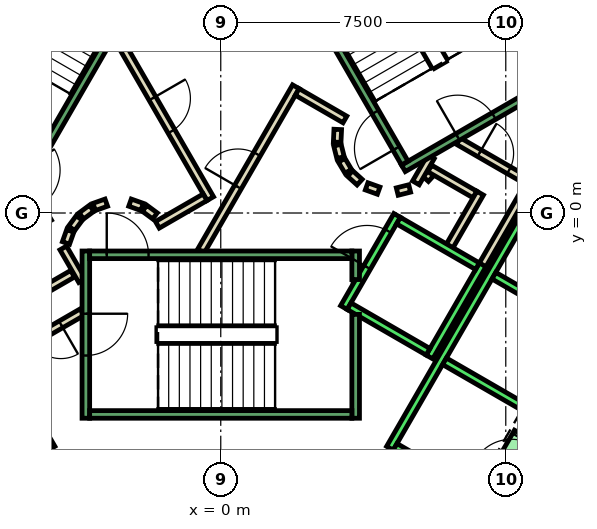
"""IFC4 building model, lengths in metres.
Left out: names, types, materials, properties, quantities, classifications, styles, units other than length and angle.
Written with IfcOpenShell. Run it as: python <this file> out.ifc"""

import sys

from ifc_helpers import new_model, si_unit, direction, frame, frame_2d, origin, place, context, subcontext, project, spatial, polyline, rectangle, outline, extrude, element, fill, save


model = new_model("IFC4")
c1 = context("Model", 3, precision=1e-05, world=origin(), true_north=direction((0.0, 1.0)))
c2 = subcontext(c1, "Body", "Model", "MODEL_VIEW")
j1 = project(units=[si_unit("LENGTHUNIT", "METRE"), si_unit("PLANEANGLEUNIT", "RADIAN")], contexts=[c1])
p1 = place(None, origin())
s1 = spatial("IfcSite", under=j1, at=p1, CompositionType="ELEMENT")
p2 = place(p1, origin())
s2 = spatial("IfcBuilding", under=s1, at=p2, CompositionType="ELEMENT")
p3 = place(p2, frame((0.0, 0.0, 155.0)))
s3 = spatial("IfcBuildingStorey", under=s2, at=p3, CompositionType="ELEMENT", Elevation=155.0)
p4 = place(p3, frame((0.0, 0.0, 3.6)))
e1 = element("IfcWall", 1, at=p4, inside=s3, PredefinedType="SHEAR", context=c2, shape_type="SweptSolid", body=[
    extrude(outline(polyline([(8.767, -6.314), (8.075, -5.914), (7.424, -7.04), (8.117, -7.44), (8.767, -6.314)])), origin(), (0.0, 0.0, 1.0), 0.2),
])
p5 = place(p3, frame((5.39, 0.898, 0.0), z_axis=(0.0, 0.0, 1.0), x_axis=(0.673828488714, 0.738887791073, 0.0)))
e2 = element("IfcWall", 2, at=p5, inside=s3, PredefinedType="PARTITIONING", context=c2, shape_type="SweptSolid", body=[
    extrude(rectangle(XDim=0.263, YDim=0.2, at=frame_2d((0.131, 0.0))), origin(), (0.0, 0.0, 1.0), 3.8),
])
p6 = place(p3, frame((5.499, 1.172, 0.0), z_axis=(0.0, 0.0, 1.0), x_axis=(0.866333505267, -0.499465972466, 0.0)))
e3 = element("IfcWall", 3, at=p6, inside=s3, PredefinedType="PARTITIONING", context=c2, shape_type="SweptSolid", body=[
    extrude(rectangle(XDim=1.374, YDim=0.2, at=frame_2d((0.687, 0.0))), origin(), (0.0, 0.0, 1.0), 3.8),
])
p7 = place(p3, frame((6.826, 0.522, 0.0), z_axis=(0.0, 0.0, 1.0), x_axis=(-0.500016722714, -0.866015748706, 0.0)))
e4 = element("IfcWall", 4, at=p7, inside=s3, PredefinedType="PARTITIONING", context=c2, shape_type="SweptSolid", body=[
    extrude(rectangle(XDim=1.7, YDim=0.2, at=frame_2d((0.85, 0.0))), origin(), (0.0, 0.0, 1.0), 3.8),
])
p8 = place(p3, frame((6.25, 1.894, 0.0), z_axis=(0.0, 0.0, 1.0), x_axis=(0.866043184279, -0.499969202016, 0.0)))
e5 = element("IfcWall", 5, at=p8, inside=s3, PredefinedType="PARTITIONING", context=c2, shape_type="SweptSolid", body=[
    extrude(rectangle(XDim=2.084, YDim=0.2, at=frame_2d((1.042, 0.0))), origin(), (0.0, 0.0, 1.0), 3.8),
])
p9 = place(p8, frame((0.642, 0.0, 0.0)))
e6 = element("IfcOpeningElement", 6, at=p9, cuts=e5, PredefinedType="OPENING", context=c2, shape_type="SweptSolid", body=[
    extrude(rectangle(XDim=0.9, YDim=2.1, at=frame_2d((0.45, 1.05))), frame((0.0, 0.11, 0.0), z_axis=(0.0, -1.0, 0.0), x_axis=(1.0, 0.0, 0.0)), (0.0, 0.0, 1.0), 0.22),
])
p10 = place(p3, frame((8.192, 0.888, 0.0), z_axis=(0.0, 0.0, 1.0), x_axis=(-0.499940625693, -0.866059680843, 0.0)))
e7 = element("IfcWall", 7, at=p10, inside=s3, PredefinedType="PARTITIONING", context=c2, shape_type="SweptSolid", body=[
    extrude(rectangle(XDim=2.68, YDim=0.2, at=frame_2d((1.34, 0.0))), origin(), (0.0, 0.0, 1.0), 3.8),
])
p11 = place(p3, frame((5.135, 0.793, 0.0), z_axis=(0.0, 0.0, 1.0), x_axis=(0.499526442893, 0.866298639529, 0.0)))
e8 = element("IfcWall", 8, at=p11, inside=s3, PredefinedType="PARTITIONING", context=c2, shape_type="SweptSolid", body=[
    extrude(rectangle(XDim=0.791, YDim=0.2, at=frame_2d((0.396, 0.0))), origin(), (0.0, 0.0, 1.0), 3.8),
])
p12 = place(p3, frame((-3.9, -1.599, 0.0), z_axis=(0.0, 0.0, 1.0), x_axis=(-0.865969445389, -0.500096910261, 0.0)))
e9 = element("IfcWall", 9, at=p12, inside=s3, PredefinedType="PARTITIONING", context=c2, shape_type="SweptSolid", body=[
    extrude(rectangle(XDim=1.373, YDim=0.2, at=frame_2d((0.687, 0.0))), origin(), (0.0, 0.0, 1.0), 3.8),
])
p13 = place(p3, frame((-3.65, -2.61, 0.0), z_axis=(0.0, 0.0, 1.0), x_axis=(-0.866072462134, -0.499918483688, 0.0)))
e10 = element("IfcWall", 10, at=p13, inside=s3, PredefinedType="PARTITIONING", context=c2, shape_type="SweptSolid", body=[
    extrude(rectangle(XDim=2.084, YDim=0.2, at=frame_2d((1.042, 0.0))), origin(), (0.0, 0.0, 1.0), 3.8),
])
p14 = place(p13, frame((0.642, 0.0, 0.0)))
e11 = element("IfcOpeningElement", 11, at=p14, cuts=e10, PredefinedType="OPENING", context=c2, shape_type="SweptSolid", body=[
    extrude(rectangle(XDim=0.9, YDim=2.1, at=frame_2d((0.45, 1.05))), frame((0.0, 0.11, 0.0), z_axis=(0.0, -1.0, 0.0), x_axis=(1.0, 0.0, 0.0)), (0.0, 0.0, 1.0), 0.22),
])
p15 = place(p3, frame((-4.145, -0.92, 0.0), z_axis=(0.0, 0.0, 1.0), x_axis=(0.499743786207, -0.866173278362, 0.0)))
e12 = element("IfcWall", 12, at=p15, inside=s3, PredefinedType="PARTITIONING", context=c2, shape_type="SweptSolid", body=[
    extrude(rectangle(XDim=0.991, YDim=0.2, at=frame_2d((0.495, 0.0))), origin(), (0.0, 0.0, 1.0), 3.8),
])
p16 = place(p3, frame((-0.52, -1.0, 0.0), z_axis=(0.0, 0.0, 1.0), x_axis=(0.50011622646, 0.865958290007, 0.0)))
e13 = element("IfcWall", 13, at=p16, inside=s3, PredefinedType="PARTITIONING", context=c2, shape_type="SweptSolid", body=[
    extrude(rectangle(XDim=4.991, YDim=0.2, at=frame_2d((2.496, 0.0))), origin(), (0.0, 0.0, 1.0), 3.8),
])
p17 = place(p16, frame((1.945, 0.0, 0.0)))
e14 = element("IfcOpeningElement", 14, at=p17, cuts=e13, PredefinedType="OPENING", context=c2, shape_type="SweptSolid", body=[
    extrude(rectangle(XDim=1.0, YDim=2.1, at=frame_2d((0.5, 1.05))), frame((0.0, 0.11, 0.0), z_axis=(0.0, -1.0, 0.0), x_axis=(1.0, 0.0, 0.0)), (0.0, 0.0, 1.0), 0.22),
])
p18 = place(p3, frame((2.012, 3.186, 0.0), z_axis=(0.0, 0.0, 1.0), x_axis=(0.865891012941, -0.500232699559, 0.0)))
e15 = element("IfcWall", 15, at=p18, inside=s3, PredefinedType="PARTITIONING", context=c2, shape_type="SweptSolid", body=[
    extrude(rectangle(XDim=1.449, YDim=0.2, at=frame_2d((0.725, 0.0))), origin(), (0.0, 0.0, 1.0), 3.8),
])
p19 = place(p3, frame((3.079, 2.199, 0.0), z_axis=(0.0, 0.0, 1.0), x_axis=(-0.047771483479, -0.998858290933, 0.0)))
e16 = element("IfcWall", 16, at=p19, inside=s3, PredefinedType="PARTITIONING", context=c2, shape_type="SweptSolid", body=[
    extrude(rectangle(XDim=0.337, YDim=0.2, at=frame_2d((0.169, 0.0))), origin(), (0.0, 0.0, 1.0), 3.8),
])
p20 = place(p3, frame((3.07, 1.786, 0.0), z_axis=(0.0, 0.0, 1.0), x_axis=(0.242705583207, -0.970099994784, 0.0)))
e17 = element("IfcWall", 17, at=p20, inside=s3, PredefinedType="PARTITIONING", context=c2, shape_type="SweptSolid", body=[
    extrude(rectangle(XDim=0.338, YDim=0.2, at=frame_2d((0.169, 0.0))), origin(), (0.0, 0.0, 1.0), 3.8),
])
for number, where, z_axis, x_axis in (
    (18, (3.182, 1.388, 0.0), (0.0, 0.0, 1.0), (0.512, -0.859, 0.0)),
    (19, (3.404, 1.039, 0.0), (0.0, 0.0, 1.0), (0.74, -0.672, 0.0)),
):
    element("IfcWall", number, at=place(p3, frame(where, z_axis=z_axis, x_axis=x_axis)), inside=s3, PredefinedType="PARTITIONING", context=c2, shape_type="SweptSolid", body=[
        extrude(rectangle(XDim=0.338, YDim=0.2, at=frame_2d((0.169, 0.0))), origin(), (0.0, 0.0, 1.0), 3.8),
    ])
p21 = place(p3, frame((3.838, 0.702, 0.0), z_axis=(0.0, 0.0, 1.0), x_axis=(0.941035081519, -0.338308993895, 0.0)))
e20 = element("IfcWall", 20, at=p21, inside=s3, PredefinedType="PARTITIONING", context=c2, shape_type="SweptSolid", body=[
    extrude(rectangle(XDim=0.337, YDim=0.2, at=frame_2d((0.168, 0.0))), origin(), (0.0, 0.0, 1.0), 3.8),
])
p22 = place(p3, frame((4.644, 0.564, 0.0), z_axis=(0.0, 0.0, 1.0), x_axis=(0.969929076366, 0.243387729394, 0.0)))
e21 = element("IfcWall", 21, at=p22, inside=s3, PredefinedType="PARTITIONING", context=c2, shape_type="SweptSolid", body=[
    extrude(rectangle(XDim=0.337, YDim=0.2, at=frame_2d((0.168, 0.0))), origin(), (0.0, 0.0, 1.0), 3.8),
])
p23 = place(p3, frame((-2.771, 4.7, 0.0), z_axis=(0.0, 0.0, 1.0), x_axis=(0.499969479948, -0.866043023828, 0.0)))
e22 = element("IfcWall", 22, at=p23, inside=s3, PredefinedType="PARTITIONING", context=c2, shape_type="SweptSolid", body=[
    extrude(rectangle(XDim=4.99, YDim=0.2, at=frame_2d((2.495, 0.0))), origin(), (0.0, 0.0, 1.0), 3.8),
])
p24 = place(p23, frame((1.945, 0.0, 0.0)))
e23 = element("IfcOpeningElement", 23, at=p24, cuts=e22, PredefinedType="OPENING", context=c2, shape_type="SweptSolid", body=[
    extrude(rectangle(XDim=1.0, YDim=2.1, at=frame_2d((0.5, 1.05))), frame((0.0, 0.11, 0.0), z_axis=(0.0, -1.0, 0.0), x_axis=(1.0, 0.0, 0.0)), (0.0, 0.0, 1.0), 0.22),
])
p25 = place(p3, frame((-0.412, 0.414, 0.0), z_axis=(0.0, 0.0, 1.0), x_axis=(-0.866017369001, -0.500013916395, 0.0)))
e24 = element("IfcWall", 24, at=p25, inside=s3, PredefinedType="PARTITIONING", context=c2, shape_type="SweptSolid", body=[
    extrude(rectangle(XDim=1.45, YDim=0.2, at=frame_2d((0.725, 0.0))), origin(), (0.0, 0.0, 1.0), 3.8),
])
p26 = place(p3, frame((-1.731, -0.077, 0.0), z_axis=(0.0, 0.0, 1.0), x_axis=(-0.804311165252, 0.594208338422, 0.0)))
e25 = element("IfcWall", 25, at=p26, inside=s3, PredefinedType="PARTITIONING", context=c2, shape_type="SweptSolid", body=[
    extrude(rectangle(XDim=0.338, YDim=0.2, at=frame_2d((0.169, 0.0))), origin(), (0.0, 0.0, 1.0), 3.8),
])
p27 = place(p3, frame((-2.07, 0.16, 0.0), z_axis=(0.0, 0.0, 1.0), x_axis=(-0.942199461132, 0.335052496547, 0.0)))
e26 = element("IfcWall", 26, at=p27, inside=s3, PredefinedType="PARTITIONING", context=c2, shape_type="SweptSolid", body=[
    extrude(rectangle(XDim=0.337, YDim=0.2, at=frame_2d((0.169, 0.0))), origin(), (0.0, 0.0, 1.0), 3.8),
])
p28 = place(p3, frame((-3.012, 0.273, 0.0), z_axis=(0.0, 0.0, 1.0), x_axis=(-0.942280615813, -0.334824194261, 0.0)))
e27 = element("IfcWall", 27, at=p28, inside=s3, PredefinedType="PARTITIONING", context=c2, shape_type="SweptSolid", body=[
    extrude(rectangle(XDim=0.338, YDim=0.2, at=frame_2d((0.169, 0.0))), origin(), (0.0, 0.0, 1.0), 3.8),
])
p29 = place(p3, frame((-3.397, 0.124, 0.0), z_axis=(0.0, 0.0, 1.0), x_axis=(-0.804311165252, -0.594208338422, 0.0)))
e28 = element("IfcWall", 28, at=p29, inside=s3, PredefinedType="PARTITIONING", context=c2, shape_type="SweptSolid", body=[
    extrude(rectangle(XDim=0.338, YDim=0.2, at=frame_2d((0.169, 0.0))), origin(), (0.0, 0.0, 1.0), 3.8),
])
p30 = place(p3, frame((-3.723, -0.131, 0.0), z_axis=(0.0, 0.0, 1.0), x_axis=(-0.594675113454, -0.803966112121, 0.0)))
e29 = element("IfcWall", 29, at=p30, inside=s3, PredefinedType="PARTITIONING", context=c2, shape_type="SweptSolid", body=[
    extrude(rectangle(XDim=0.338, YDim=0.2, at=frame_2d((0.169, 0.0))), origin(), (0.0, 0.0, 1.0), 3.8),
])
p31 = place(p3, frame((-3.96, -0.47, 0.0), z_axis=(0.0, 0.0, 1.0), x_axis=(-0.334824194261, -0.942280615813, 0.0)))
e30 = element("IfcWall", 30, at=p31, inside=s3, PredefinedType="PARTITIONING", context=c2, shape_type="SweptSolid", body=[
    extrude(rectangle(XDim=0.338, YDim=0.2, at=frame_2d((0.169, 0.0))), origin(), (0.0, 0.0, 1.0), 3.8),
])
p32 = place(p3, frame((-9.751, 2.99, 0.0), z_axis=(0.0, 0.0, 1.0), x_axis=(0.50000090737, -0.866024879913, 0.0)))
e31 = element("IfcWall", 31, at=p32, inside=s3, PredefinedType="STANDARD", context=c2, shape_type="SweptSolid", body=[
    extrude(rectangle(XDim=10.6, YDim=0.2, at=frame_2d((5.3, 0.0))), origin(), (0.0, 0.0, 1.0), 3.8),
])
p33 = place(p3, frame((3.24, -2.488, 0.0), z_axis=(0.0, 0.0, 1.0), x_axis=(0.49994636267, 0.866056369097, 0.0)))
e32 = element("IfcWall", 32, at=p33, inside=s3, PredefinedType="STANDARD", context=c2, shape_type="SweptSolid", body=[
    extrude(rectangle(XDim=2.8, YDim=0.2, at=frame_2d((1.4, 0.0))), origin(), (0.0, 0.0, 1.0), 3.8),
])
p34 = place(p33, frame((1.225, 0.0, 0.0)))
e33 = element("IfcOpeningElement", 33, at=p34, cuts=e32, PredefinedType="OPENING", context=c2, shape_type="SweptSolid", body=[
    extrude(rectangle(XDim=1.1, YDim=2.1, at=frame_2d((0.55, 1.05))), frame((0.0, 0.11, 0.0), z_axis=(0.0, -1.0, 0.0), x_axis=(1.0, 0.0, 0.0)), (0.0, 0.0, 1.0), 0.22),
])
p35 = place(p3, frame((5.492, -3.788, 0.0), z_axis=(0.0, 0.0, 1.0), x_axis=(0.500011755427, 0.866018616679, 0.0)))
e34 = element("IfcWall", 34, at=p35, inside=s3, PredefinedType="STANDARD", context=c2, shape_type="SweptSolid", body=[
    extrude(rectangle(XDim=2.8, YDim=0.2, at=frame_2d((1.4, 0.0))), origin(), (0.0, 0.0, 1.0), 3.8),
])
p36 = place(p3, frame((3.377, -2.452, 0.0), z_axis=(0.0, 0.0, 1.0), x_axis=(0.865955154139, -0.50012165622, 0.0)))
e35 = element("IfcWall", 35, at=p36, inside=s3, PredefinedType="STANDARD", context=c2, shape_type="SweptSolid", body=[
    extrude(rectangle(XDim=2.4, YDim=0.2, at=frame_2d((1.2, 0.0))), origin(), (0.0, 0.0, 1.0), 3.8),
])
p37 = place(p3, frame((4.677, -0.2, 0.0), z_axis=(0.0, 0.0, 1.0), x_axis=(0.865973769406, -0.500089422704, 0.0)))
e36 = element("IfcWall", 36, at=p37, inside=s3, PredefinedType="STANDARD", context=c2, shape_type="SweptSolid", body=[
    extrude(rectangle(XDim=2.399, YDim=0.2, at=frame_2d((1.2, 0.0))), origin(), (0.0, 0.0, 1.0), 3.8),
])
p38 = place(p3, frame((4.451, -6.19, 0.0), z_axis=(0.0, 0.0, 1.0), x_axis=(0.50000090737, 0.866024879913, 0.0)))
e37 = element("IfcWall", 37, at=p38, inside=s3, PredefinedType="STANDARD", context=c2, shape_type="SweptSolid", body=[
    extrude(rectangle(XDim=10.6, YDim=0.2, at=frame_2d((5.3, 0.0))), origin(), (0.0, 0.0, 1.0), 3.8),
])
for number, where, z_axis, x_axis in (
    (38, (4.588, -6.153, 0.0), (0.0, 0.0, 1.0), (0.866, -0.5, 0.0)),
    (39, (5.888, -3.902, 0.0), (0.0, 0.0, 1.0), (0.866, -0.5, 0.0)),
    (40, (7.188, -1.65, 0.0), (0.0, 0.0, 1.0), (0.866, -0.5, 0.0)),
):
    element("IfcWall", number, at=place(p3, frame(where, z_axis=z_axis, x_axis=x_axis)), inside=s3, PredefinedType="STANDARD", context=c2, shape_type="SweptSolid", body=[
        extrude(rectangle(XDim=2.5, YDim=0.2, at=frame_2d((1.25, 0.0))), origin(), (0.0, 0.0, 1.0), 3.8),
    ])
p39 = place(p3, frame((7.598, -7.14, 0.0), z_axis=(0.0, 0.0, 1.0), x_axis=(0.500362116554, 0.865816234728, 0.0)))
e41 = element("IfcWall", 41, at=p39, inside=s3, PredefinedType="STANDARD", context=c2, shape_type="SweptSolid", body=[
    extrude(rectangle(XDim=1.299, YDim=1.2, at=frame_2d((0.65, 0.0))), origin(), (0.0, 0.0, 1.0), 2.4),
])
p40 = place(p39, frame((0.1, 0.0, 0.0)))
e42 = element("IfcOpeningElement", 42, at=p40, cuts=e41, PredefinedType="OPENING", context=c2, shape_type="SweptSolid", body=[
    extrude(rectangle(XDim=1.1, YDim=2.3, at=frame_2d((0.55, 1.15))), frame((0.0, 0.61, 0.0), z_axis=(0.0, -1.0, 0.0), x_axis=(1.0, 0.0, 0.0)), (0.0, 0.0, 1.0), 1.22),
])
p41 = place(p3, frame((-3.55, -1.0, 0.0), z_axis=(0.0, 0.0, 1.0), x_axis=(0.0, -1.0, 0.0)))
e43 = element("IfcWall", 43, at=p41, inside=s3, PredefinedType="STANDARD", context=c2, shape_type="SweptSolid", body=[
    extrude(rectangle(XDim=4.4, YDim=0.2, at=frame_2d((2.2, 0.0))), origin(), (0.0, 0.0, 1.0), 3.8),
])
p42 = place(p41, frame((1.65, 0.0, 0.0)))
e44 = element("IfcOpeningElement", 44, at=p42, cuts=e43, PredefinedType="OPENING", context=c2, shape_type="SweptSolid", body=[
    extrude(rectangle(XDim=1.1, YDim=2.2, at=frame_2d((0.55, 1.1))), frame((0.0, 0.11, 0.0), z_axis=(0.0, -1.0, 0.0), x_axis=(1.0, 0.0, 0.0)), (0.0, 0.0, 1.0), 0.22),
])
p43 = place(p3, frame((3.55, -2.667, 0.0), z_axis=(0.0, 0.0, 1.0), x_axis=(0.0, -1.0, 0.0)))
e45 = element("IfcWall", 45, at=p43, inside=s3, PredefinedType="STANDARD", context=c2, shape_type="SweptSolid", body=[
    extrude(rectangle(XDim=2.733, YDim=0.2, at=frame_2d((1.366, 0.0))), origin(), (0.0, 0.0, 1.0), 3.8),
])
p44 = place(p3, frame((3.55, -1.0, 0.0), z_axis=(0.0, 0.0, 1.0), x_axis=(0.0, -1.0, 0.0)))
e46 = element("IfcWall", 46, at=p44, inside=s3, PredefinedType="STANDARD", context=c2, shape_type="SweptSolid", body=[
    extrude(rectangle(XDim=0.751, YDim=0.2, at=frame_2d((0.375, 0.0))), origin(), (0.0, 0.0, 1.0), 3.8),
])
p45 = place(p3, frame((-3.45, -1.1, 0.0), z_axis=(0.0, 0.0, 1.0), x_axis=(1.0, 0.0, 0.0)))
e47 = element("IfcWall", 47, at=p45, inside=s3, PredefinedType="STANDARD", context=c2, shape_type="SweptSolid", body=[
    extrude(rectangle(XDim=6.9, YDim=0.2, at=frame_2d((3.45, 0.0))), origin(), (0.0, 0.0, 1.0), 3.8),
])
p46 = place(p45, frame((0.45, 0.0, 0.0)))
e48 = element("IfcOpeningElement", 48, at=p46, cuts=e47, PredefinedType="OPENING", context=c2, shape_type="SweptSolid", body=[
    extrude(rectangle(XDim=1.1, YDim=2.2, at=frame_2d((0.55, 1.1))), frame((0.0, 0.11, 0.0), z_axis=(0.0, -1.0, 0.0), x_axis=(1.0, 0.0, 0.0)), (0.0, 0.0, 1.0), 0.22),
])
p47 = place(p3, frame((-3.45, -5.3, 0.0), z_axis=(0.0, 0.0, 1.0), x_axis=(1.0, 0.0, 0.0)))
e49 = element("IfcWall", 49, at=p47, inside=s3, PredefinedType="STANDARD", context=c2, shape_type="SweptSolid", body=[
    extrude(rectangle(XDim=6.9, YDim=0.2, at=frame_2d((3.45, 0.0))), origin(), (0.0, 0.0, 1.0), 3.8),
])
p48 = place(p3, frame((4.806, 1.176, 0.0), z_axis=(0.0, 0.0, 1.0), x_axis=(0.866059941101, 0.499940174841, 0.0)))
e50 = element("IfcWall", 50, at=p48, inside=s3, PredefinedType="STANDARD", context=c2, shape_type="SweptSolid", body=[
    extrude(rectangle(XDim=4.4, YDim=0.2, at=frame_2d((2.2, 0.0))), origin(), (0.0, 0.0, 1.0), 3.8),
])
p49 = place(p48, frame((1.65, 0.0, 0.0)))
e51 = element("IfcOpeningElement", 51, at=p49, cuts=e50, PredefinedType="OPENING", context=c2, shape_type="SweptSolid", body=[
    extrude(rectangle(XDim=1.1, YDim=2.2, at=frame_2d((0.55, 1.1))), frame((0.0, 0.11, 0.0), z_axis=(0.0, -1.0, 0.0), x_axis=(1.0, 0.0, 0.0)), (0.0, 0.0, 1.0), 0.22),
])
p50 = place(p3, frame((4.843, 1.312, 0.0), z_axis=(0.0, 0.0, 1.0), x_axis=(-0.499963383562, 0.866046543262, 0.0)))
e52 = element("IfcWall", 52, at=p50, inside=s3, PredefinedType="STANDARD", context=c2, shape_type="SweptSolid", body=[
    extrude(rectangle(XDim=6.9, YDim=0.2, at=frame_2d((3.45, 0.0))), origin(), (0.0, 0.0, 1.0), 3.8),
])
p51 = place(p50, frame((0.45, 0.0, 0.0)))
e53 = element("IfcOpeningElement", 53, at=p51, cuts=e52, PredefinedType="OPENING", context=c2, shape_type="SweptSolid", body=[
    extrude(rectangle(XDim=1.1, YDim=2.2, at=frame_2d((0.55, 1.1))), frame((0.0, 0.11, 0.0), z_axis=(0.0, -1.0, 0.0), x_axis=(1.0, 0.0, 0.0)), (0.0, 0.0, 1.0), 0.22),
])
p52 = place(p3, frame((8.48, 3.412, 0.0), z_axis=(0.0, 0.0, 1.0), x_axis=(-0.499978703459, 0.866037698999, 0.0)))
e54 = element("IfcWall", 54, at=p52, inside=s3, PredefinedType="STANDARD", context=c2, shape_type="SweptSolid", body=[
    extrude(rectangle(XDim=6.9, YDim=0.2, at=frame_2d((3.45, 0.0))), origin(), (0.0, 0.0, 1.0), 3.8),
])
p53 = place(p3, frame((-1.393, 7.288, 0.0), z_axis=(0.0, 0.0, 1.0), x_axis=(-0.499963383562, -0.866046543262, 0.0)))
e55 = element("IfcWall", 55, at=p53, inside=s3, PredefinedType="STANDARD", context=c2, shape_type="SweptSolid", body=[
    extrude(rectangle(XDim=6.9, YDim=0.2, at=frame_2d((3.45, 0.0))), origin(), (0.0, 0.0, 1.0), 3.8),
])
p54 = place(p53, frame((0.45, 0.0, 0.0)))
e56 = element("IfcOpeningElement", 56, at=p54, cuts=e55, PredefinedType="OPENING", context=c2, shape_type="SweptSolid", body=[
    extrude(rectangle(XDim=1.1, YDim=2.2, at=frame_2d((0.55, 1.1))), frame((0.0, 0.11, 0.0), z_axis=(0.0, -1.0, 0.0), x_axis=(1.0, 0.0, 0.0)), (0.0, 0.0, 1.0), 0.22),
])
p55 = place(p17, origin())
e57 = element("IfcDoor", 57, at=p55, inside=s3, OperationType="SINGLE_SWING_LEFT", PredefinedType="DOOR", context=c2, shape_type="SweptSolid", body=[
    extrude(rectangle(XDim=1.0, YDim=2.1, at=frame_2d((0.5, 1.05))), frame((0.0, 0.025, 0.0), z_axis=(0.0, -1.0, 0.0), x_axis=(1.0, 0.0, 0.0)), (0.0, 0.0, 1.0), 0.05),
])
fill(e14, e57)
p56 = place(p24, origin())
e58 = element("IfcDoor", 58, at=p56, inside=s3, OperationType="SINGLE_SWING_RIGHT", PredefinedType="DOOR", context=c2, shape_type="SweptSolid", body=[
    extrude(rectangle(XDim=1.0, YDim=2.1, at=frame_2d((0.5, 1.05))), frame((0.0, 0.025, 0.0), z_axis=(0.0, -1.0, 0.0), x_axis=(1.0, 0.0, 0.0)), (0.0, 0.0, 1.0), 0.05),
])
fill(e23, e58)
p57 = place(p9, origin())
e59 = element("IfcDoor", 59, at=p57, inside=s3, OperationType="SINGLE_SWING_LEFT", PredefinedType="DOOR", context=c2, shape_type="SweptSolid", body=[
    extrude(rectangle(XDim=0.9, YDim=2.1, at=frame_2d((0.45, 1.05))), frame((0.0, 0.025, 0.0), z_axis=(0.0, -1.0, 0.0), x_axis=(1.0, 0.0, 0.0)), (0.0, 0.0, 1.0), 0.05),
])
fill(e6, e59)
p58 = place(p14, origin())
e60 = element("IfcDoor", 60, at=p58, inside=s3, OperationType="SINGLE_SWING_LEFT", PredefinedType="DOOR", context=c2, shape_type="SweptSolid", body=[
    extrude(rectangle(XDim=0.9, YDim=2.1, at=frame_2d((0.45, 1.05))), frame((0.0, 0.025, 0.0), z_axis=(0.0, -1.0, 0.0), x_axis=(1.0, 0.0, 0.0)), (0.0, 0.0, 1.0), 0.05),
])
fill(e11, e60)
p59 = place(p40, origin())
e61 = element("IfcDoor", 61, at=p59, inside=s3, OperationType="SLIDING_TO_LEFT", PredefinedType="DOOR", context=c2, shape_type="SweptSolid", body=[
    extrude(rectangle(XDim=1.1, YDim=2.3, at=frame_2d((0.55, 1.15))), frame((0.0, 0.025, 0.0), z_axis=(0.0, -1.0, 0.0), x_axis=(1.0, 0.0, 0.0)), (0.0, 0.0, 1.0), 0.05),
])
fill(e42, e61)
p60 = place(p34, origin())
e62 = element("IfcDoor", 62, at=p60, inside=s3, OperationType="SLIDING_TO_LEFT", PredefinedType="DOOR", context=c2, shape_type="SweptSolid", body=[
    extrude(rectangle(XDim=1.1, YDim=2.1, at=frame_2d((0.55, 1.05))), frame((0.0, 0.025, 0.0), z_axis=(0.0, -1.0, 0.0), x_axis=(1.0, 0.0, 0.0)), (0.0, 0.0, 1.0), 0.05),
])
fill(e33, e62)
p61 = place(p46, origin())
e63 = element("IfcDoor", 63, at=p61, inside=s3, OperationType="SINGLE_SWING_LEFT", PredefinedType="DOOR", context=c2, shape_type="SweptSolid", body=[
    extrude(rectangle(XDim=1.1, YDim=2.2, at=frame_2d((0.55, 1.1))), frame((0.0, 0.025, 0.0), z_axis=(0.0, -1.0, 0.0), x_axis=(1.0, 0.0, 0.0)), (0.0, 0.0, 1.0), 0.05),
])
fill(e48, e63)
p62 = place(p42, origin())
e64 = element("IfcDoor", 64, at=p62, inside=s3, OperationType="SINGLE_SWING_LEFT", PredefinedType="DOOR", context=c2, shape_type="SweptSolid", body=[
    extrude(rectangle(XDim=1.1, YDim=2.2, at=frame_2d((0.55, 1.1))), frame((0.0, 0.025, 0.0), z_axis=(0.0, -1.0, 0.0), x_axis=(1.0, 0.0, 0.0)), (0.0, 0.0, 1.0), 0.05),
])
fill(e44, e64)
p63 = place(p51, origin())
e65 = element("IfcDoor", 65, at=p63, inside=s3, OperationType="SINGLE_SWING_LEFT", PredefinedType="DOOR", context=c2, shape_type="SweptSolid", body=[
    extrude(rectangle(XDim=1.1, YDim=2.2, at=frame_2d((0.55, 1.1))), frame((0.0, 0.025, 0.0), z_axis=(0.0, -1.0, 0.0), x_axis=(1.0, 0.0, 0.0)), (0.0, 0.0, 1.0), 0.05),
])
fill(e53, e65)
p64 = place(p49, origin())
e66 = element("IfcDoor", 66, at=p64, inside=s3, OperationType="SINGLE_SWING_LEFT", PredefinedType="DOOR", context=c2, shape_type="SweptSolid", body=[
    extrude(rectangle(XDim=1.1, YDim=2.2, at=frame_2d((0.55, 1.1))), frame((0.0, 0.025, 0.0), z_axis=(0.0, -1.0, 0.0), x_axis=(1.0, 0.0, 0.0)), (0.0, 0.0, 1.0), 0.05),
])
fill(e51, e66)
save(model, sys.argv[1])
